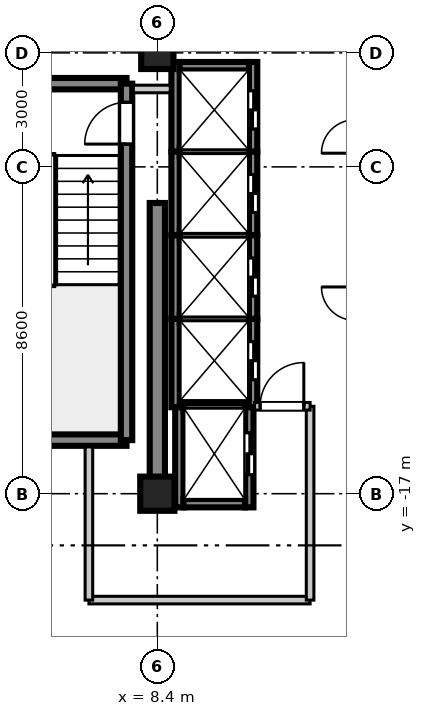
"""IFC4 building model, lengths in metres.
Left out: names, types, materials, properties, quantities, classifications, styles, units other than length and angle.
Written with IfcOpenShell. Run it as: python <this file> out.ifc"""

import sys

from ifc_helpers import new_model, si_unit, direction, frame, frame_2d, origin, origin_2d, place, context, subcontext, project, spatial, rectangle, extrude, source, transform, mapped, element, fill, save


model = new_model("IFC4")
c1 = context("Model", 3, precision=1e-05, world=origin(), true_north=direction((0.0, 1.0)))
c2 = subcontext(c1, "Body", "Model", "MODEL_VIEW")
j1 = project(units=[si_unit("LENGTHUNIT", "METRE"), si_unit("PLANEANGLEUNIT", "RADIAN")], contexts=[c1])
p1 = place(None, origin())
s1 = spatial("IfcSite", under=j1, at=p1, CompositionType="ELEMENT")
p2 = place(p1, origin())
s2 = spatial("IfcBuilding", under=s1, at=p2, CompositionType="ELEMENT")
p3 = place(p2, frame((0.0, 0.0, 327.15)))
s3 = spatial("IfcBuildingStorey", under=s2, at=p3, CompositionType="ELEMENT", Elevation=327.15)
m1 = source(origin(), c2, "Body", "SweptSolid", [
    extrude(rectangle(XDim=0.9, YDim=0.9, at=origin_2d()), origin(), (0.0, 0.0, 1.0), 3.755),
])
p4 = place(p3, frame((8.4, -17.0, 0.0), z_axis=(0.0, 0.0, 1.0), x_axis=(1.0, 0.0, 0.0)))
e1 = element("IfcColumn", 1, at=p4, inside=s3, PredefinedType="COLUMN", context=c2, shape_type="MappedRepresentation", body=[
    mapped(m1, transform((0.0, 0.0, 0.0), scale=1.0)),
])
m2 = source(origin(), c2, "Body", "SweptSolid", [
    extrude(rectangle(XDim=0.85, YDim=0.85, at=origin_2d()), origin(), (0.0, 0.0, 1.0), 3.755),
])
p5 = place(p3, frame((8.4, -5.4, 0.0), z_axis=(0.0, 0.0, 1.0), x_axis=(1.0, 0.0, 0.0)))
e2 = element("IfcColumn", 2, at=p5, inside=s3, PredefinedType="PILASTER", context=c2, shape_type="MappedRepresentation", body=[
    mapped(m2, transform((0.0, 0.0, 0.0), scale=1.0)),
])
m3 = source(origin(), c2, "Body", "SweptSolid", [
    extrude(rectangle(XDim=7.65, YDim=0.4, at=frame_2d((3.825, 0.0))), origin(), (0.0, 0.0, 1.0), 3.5),
])
p6 = place(p3, frame((8.4, -17.0, 0.0), z_axis=(0.0, 0.0, 1.0), x_axis=(0.0, 1.0, 0.0)))
e3 = element("IfcWall", 3, at=p6, inside=s3, PredefinedType="SHEAR", context=c2, shape_type="MappedRepresentation", body=[
    mapped(m3, transform((0.0, 0.0, 0.0), scale=1.0)),
])
m4 = source(origin(), c2, "Body", "SweptSolid", [
    extrude(rectangle(XDim=3.98, YDim=0.3, at=frame_2d((1.99, 0.0))), origin(), (0.0, 0.0, 1.0), 3.5),
])
for number, where, z_axis, x_axis in (
    (4, (3.61, -15.59, 0.0), (0.0, 0.0, 1.0), (1.0, 0.0, 0.0)),
    (5, (3.61, -6.21, 0.0), (0.0, 0.0, 1.0), (1.0, 0.0, 0.0)),
):
    element("IfcWall", number, at=place(p3, frame(where, z_axis=z_axis, x_axis=x_axis)), inside=s3, PredefinedType="SHEAR", context=c2, shape_type="MappedRepresentation", body=[
        mapped(m4, transform((0.0, 0.0, 0.0), scale=1.0)),
    ])
m5 = source(origin(), c2, "Body", "SweptSolid", [
    extrude(rectangle(XDim=9.38, YDim=0.3, at=frame_2d((4.69, 0.0))), origin(), (0.0, 0.0, 1.0), 3.5),
])
p7 = place(p3, frame((7.59, -15.59, 0.0), z_axis=(0.0, 0.0, 1.0), x_axis=(0.0, 1.0, 0.0)))
e6 = element("IfcWall", 6, at=p7, inside=s3, PredefinedType="SHEAR", context=c2, shape_type="MappedRepresentation", body=[
    mapped(m5, transform((0.0, 0.0, 0.0), scale=1.0)),
])
p8 = place(p7, frame((7.79, 0.0, 0.0)))
e7 = element("IfcOpeningElement", 7, at=p8, cuts=e6, PredefinedType="OPENING", context=c2, shape_type="SweptSolid", body=[
    extrude(rectangle(XDim=1.1, YDim=2.15, at=frame_2d((0.55, 1.075))), frame((0.0, 0.16, 0.0), z_axis=(0.0, -1.0, 0.0), x_axis=(1.0, 0.0, 0.0)), (0.0, 0.0, 1.0), 0.32),
])
m6 = source(origin(), c2, "Body", "SweptSolid", [
    extrude(rectangle(XDim=2.36, YDim=0.22, at=frame_2d((1.18, 0.0))), origin(), (0.0, 0.0, 1.0), 3.5),
])
p9 = place(p3, frame((8.88, -8.0, 0.0), z_axis=(0.0, 0.0, 1.0), x_axis=(0.0, 1.0, 0.0)))
e8 = element("IfcWall", 8, at=p9, inside=s3, PredefinedType="SHEAR", context=c2, shape_type="MappedRepresentation", body=[
    mapped(m6, transform((0.0, 0.0, 0.0), scale=1.0)),
])
p10 = place(p3, frame((10.92, -8.0, 0.0), z_axis=(0.0, 0.0, 1.0), x_axis=(0.0, 1.0, 0.0)))
e9 = element("IfcWall", 9, at=p10, inside=s3, PredefinedType="SHEAR", context=c2, shape_type="MappedRepresentation", body=[
    mapped(m6, transform((0.0, 0.0, 0.0), scale=1.0)),
])
p11 = place(p10, frame((0.6, 0.0, 0.0)))
e10 = element("IfcOpeningElement", 10, at=p11, cuts=e9, PredefinedType="OPENING", context=c2, shape_type="SweptSolid", body=[
    extrude(rectangle(XDim=1.0, YDim=2.2, at=frame_2d((0.5, 1.1))), frame((0.0, 0.12, 0.0), z_axis=(0.0, -1.0, 0.0), x_axis=(1.0, 0.0, 0.0)), (0.0, 0.0, 1.0), 0.24),
])
m7 = source(origin(), c2, "Body", "SweptSolid", [
    extrude(rectangle(XDim=1.82, YDim=0.22, at=frame_2d((0.91, 0.0))), origin(), (0.0, 0.0, 1.0), 3.5),
])
p12 = place(p3, frame((8.99, -5.75, 0.0), z_axis=(0.0, 0.0, 1.0), x_axis=(1.0, 0.0, 0.0)))
e11 = element("IfcWall", 11, at=p12, inside=s3, PredefinedType="SHEAR", context=c2, shape_type="MappedRepresentation", body=[
    mapped(m7, transform((0.0, 0.0, 0.0), scale=1.0)),
])
m8 = source(origin(), c2, "Body", "SweptSolid", [
    extrude(rectangle(XDim=2.2, YDim=0.22, at=frame_2d((1.1, 0.0))), origin(), (0.0, 0.0, 1.0), 3.5),
])
p13 = place(p3, frame((8.88, -10.2, 0.0), z_axis=(0.0, 0.0, 1.0), x_axis=(0.0, 1.0, 0.0)))
e12 = element("IfcWall", 12, at=p13, inside=s3, PredefinedType="SHEAR", context=c2, shape_type="MappedRepresentation", body=[
    mapped(m8, transform((0.0, 0.0, 0.0), scale=1.0)),
])
p14 = place(p3, frame((10.92, -10.2, 0.0), z_axis=(0.0, 0.0, 1.0), x_axis=(0.0, 1.0, 0.0)))
e13 = element("IfcWall", 13, at=p14, inside=s3, PredefinedType="SHEAR", context=c2, shape_type="MappedRepresentation", body=[
    mapped(m8, transform((0.0, 0.0, 0.0), scale=1.0)),
])
p15 = place(p14, frame((0.6, 0.0, 0.0)))
e14 = element("IfcOpeningElement", 14, at=p15, cuts=e13, PredefinedType="OPENING", context=c2, shape_type="SweptSolid", body=[
    extrude(rectangle(XDim=1.0, YDim=2.2, at=frame_2d((0.5, 1.1))), frame((0.0, 0.12, 0.0), z_axis=(0.0, -1.0, 0.0), x_axis=(1.0, 0.0, 0.0)), (0.0, 0.0, 1.0), 0.24),
])
m9 = source(origin(), c2, "Body", "SweptSolid", [
    extrude(rectangle(XDim=1.82, YDim=0.22, at=frame_2d((0.91, 0.0))), origin(), (0.0, 0.0, 1.0), 3.8),
])
p16 = place(p3, frame((8.99, -8.0, 0.0), z_axis=(0.0, 0.0, 1.0), x_axis=(1.0, 0.0, 0.0)))
e15 = element("IfcWall", 15, at=p16, inside=s3, PredefinedType="SHEAR", context=c2, shape_type="MappedRepresentation", body=[
    mapped(m9, transform((0.0, 0.0, 0.0), scale=1.0)),
])
p17 = place(p3, frame((8.88, -12.4, 0.0), z_axis=(0.0, 0.0, 1.0), x_axis=(0.0, 1.0, 0.0)))
e16 = element("IfcWall", 16, at=p17, inside=s3, PredefinedType="SHEAR", context=c2, shape_type="MappedRepresentation", body=[
    mapped(m8, transform((0.0, 0.0, 0.0), scale=1.0)),
])
p18 = place(p3, frame((10.92, -12.4, 0.0), z_axis=(0.0, 0.0, 1.0), x_axis=(0.0, 1.0, 0.0)))
e17 = element("IfcWall", 17, at=p18, inside=s3, PredefinedType="SHEAR", context=c2, shape_type="MappedRepresentation", body=[
    mapped(m8, transform((0.0, 0.0, 0.0), scale=1.0)),
])
p19 = place(p18, frame((0.6, 0.0, 0.0)))
e18 = element("IfcOpeningElement", 18, at=p19, cuts=e17, PredefinedType="OPENING", context=c2, shape_type="SweptSolid", body=[
    extrude(rectangle(XDim=1.0, YDim=2.2, at=frame_2d((0.5, 1.1))), frame((0.0, 0.12, 0.0), z_axis=(0.0, -1.0, 0.0), x_axis=(1.0, 0.0, 0.0)), (0.0, 0.0, 1.0), 0.24),
])
p20 = place(p3, frame((8.99, -10.2, 0.0), z_axis=(0.0, 0.0, 1.0), x_axis=(1.0, 0.0, 0.0)))
e19 = element("IfcWall", 19, at=p20, inside=s3, PredefinedType="SHEAR", context=c2, shape_type="MappedRepresentation", body=[
    mapped(m9, transform((0.0, 0.0, 0.0), scale=1.0)),
])
m10 = source(origin(), c2, "Body", "SweptSolid", [
    extrude(rectangle(XDim=2.325, YDim=0.22, at=frame_2d((1.163, 0.0))), origin(), (0.0, 0.0, 1.0), 3.5),
])
p21 = place(p3, frame((8.88, -14.725, 0.0), z_axis=(0.0, 0.0, 1.0), x_axis=(0.0, 1.0, 0.0)))
e20 = element("IfcWall", 20, at=p21, inside=s3, PredefinedType="SHEAR", context=c2, shape_type="MappedRepresentation", body=[
    mapped(m10, transform((0.0, 0.0, 0.0), scale=1.0)),
])
p22 = place(p3, frame((10.92, -14.725, 0.0), z_axis=(0.0, 0.0, 1.0), x_axis=(0.0, 1.0, 0.0)))
e21 = element("IfcWall", 21, at=p22, inside=s3, PredefinedType="SHEAR", context=c2, shape_type="MappedRepresentation", body=[
    mapped(m10, transform((0.0, 0.0, 0.0), scale=1.0)),
])
p23 = place(p22, frame((0.725, 0.0, 0.0)))
e22 = element("IfcOpeningElement", 22, at=p23, cuts=e21, PredefinedType="OPENING", context=c2, shape_type="SweptSolid", body=[
    extrude(rectangle(XDim=1.0, YDim=2.2, at=frame_2d((0.5, 1.1))), frame((0.0, 0.12, 0.0), z_axis=(0.0, -1.0, 0.0), x_axis=(1.0, 0.0, 0.0)), (0.0, 0.0, 1.0), 0.24),
])
p24 = place(p3, frame((8.99, -12.4, 0.0), z_axis=(0.0, 0.0, 1.0), x_axis=(1.0, 0.0, 0.0)))
e23 = element("IfcWall", 23, at=p24, inside=s3, PredefinedType="SHEAR", context=c2, shape_type="MappedRepresentation", body=[
    mapped(m9, transform((0.0, 0.0, 0.0), scale=1.0)),
])
m11 = source(origin(), c2, "Body", "SweptSolid", [
    extrude(rectangle(XDim=2.635, YDim=0.22, at=frame_2d((1.317, 0.0))), origin(), (0.0, 0.0, 1.0), 3.5),
])
p25 = place(p3, frame((8.98, -17.36, 0.0), z_axis=(0.0, 0.0, 1.0), x_axis=(0.0, 1.0, 0.0)))
e24 = element("IfcWall", 24, at=p25, inside=s3, PredefinedType="SHEAR", context=c2, shape_type="MappedRepresentation", body=[
    mapped(m11, transform((0.0, 0.0, 0.0), scale=1.0)),
])
p26 = place(p3, frame((10.82, -17.36, 0.0), z_axis=(0.0, 0.0, 1.0), x_axis=(0.0, 1.0, 0.0)))
e25 = element("IfcWall", 25, at=p26, inside=s3, PredefinedType="SHEAR", context=c2, shape_type="MappedRepresentation", body=[
    mapped(m11, transform((0.0, 0.0, 0.0), scale=1.0)),
])
p27 = place(p26, frame((0.86, 0.0, 0.0)))
e26 = element("IfcOpeningElement", 26, at=p27, cuts=e25, PredefinedType="OPENING", context=c2, shape_type="SweptSolid", body=[
    extrude(rectangle(XDim=1.1, YDim=2.2, at=frame_2d((0.55, 1.1))), frame((0.0, 0.12, 0.0), z_axis=(0.0, -1.0, 0.0), x_axis=(1.0, 0.0, 0.0)), (0.0, 0.0, 1.0), 0.24),
])
m12 = source(origin(), c2, "Body", "SweptSolid", [
    extrude(rectangle(XDim=1.62, YDim=0.22, at=frame_2d((0.81, 0.0))), origin(), (0.0, 0.0, 1.0), 3.5),
])
p28 = place(p3, frame((9.09, -17.25, 0.0), z_axis=(0.0, 0.0, 1.0), x_axis=(1.0, 0.0, 0.0)))
e27 = element("IfcWall", 27, at=p28, inside=s3, PredefinedType="SHEAR", context=c2, shape_type="MappedRepresentation", body=[
    mapped(m12, transform((0.0, 0.0, 0.0), scale=1.0)),
])
m13 = source(origin(), c2, "Body", "SweptSolid", [
    extrude(rectangle(XDim=1.62, YDim=0.22, at=frame_2d((0.81, 0.0))), origin(), (0.0, 0.0, 1.0), 3.8),
])
p29 = place(p3, frame((9.09, -14.725, 0.0), z_axis=(0.0, 0.0, 1.0), x_axis=(1.0, 0.0, 0.0)))
e28 = element("IfcWall", 28, at=p29, inside=s3, PredefinedType="SHEAR", context=c2, shape_type="MappedRepresentation", body=[
    mapped(m13, transform((0.0, 0.0, 0.0), scale=1.0)),
])
m14 = source(origin(), c2, "Body", "SweptSolid", [
    extrude(rectangle(XDim=5.82, YDim=0.2, at=frame_2d((2.91, 0.0))), origin(), (0.0, 0.0, 1.0), 2.84),
])
p30 = place(p3, frame((6.6, -19.8, 0.0), z_axis=(0.0, 0.0, 1.0), x_axis=(1.0, 0.0, 0.0)))
e29 = element("IfcWall", 29, at=p30, inside=s3, PredefinedType="PARTITIONING", context=c2, shape_type="MappedRepresentation", body=[
    mapped(m14, transform((0.0, 0.0, 0.0), scale=1.0)),
])
m15 = source(origin(), c2, "Body", "SweptSolid", [
    extrude(rectangle(XDim=4.03, YDim=0.2, at=frame_2d((2.015, 0.0))), origin(), (0.0, 0.0, 1.0), 2.84),
])
p31 = place(p3, frame((6.6, -19.8, 0.0), z_axis=(0.0, 0.0, 1.0), x_axis=(0.0, 1.0, 0.0)))
e30 = element("IfcWall", 30, at=p31, inside=s3, PredefinedType="PARTITIONING", context=c2, shape_type="MappedRepresentation", body=[
    mapped(m15, transform((0.0, 0.0, 0.0), scale=1.0)),
])
m16 = source(origin(), c2, "Body", "SweptSolid", [
    extrude(rectangle(XDim=5.1, YDim=0.2, at=frame_2d((2.55, 0.0))), origin(), (0.0, 0.0, 1.0), 2.84),
])
p32 = place(p3, frame((12.42, -19.8, 0.0), z_axis=(0.0, 0.0, 1.0), x_axis=(0.0, 1.0, 0.0)))
e31 = element("IfcWall", 31, at=p32, inside=s3, PredefinedType="PARTITIONING", context=c2, shape_type="MappedRepresentation", body=[
    mapped(m16, transform((0.0, 0.0, 0.0), scale=1.0)),
])
m17 = source(origin(), c2, "Body", "SweptSolid", [
    extrude(rectangle(XDim=1.46, YDim=0.2, at=frame_2d((0.73, 0.0))), origin(), (0.0, 0.0, 1.0), 2.84),
])
p33 = place(p3, frame((10.96, -14.7, 0.0), z_axis=(0.0, 0.0, 1.0), x_axis=(1.0, 0.0, 0.0)))
e32 = element("IfcWall", 32, at=p33, inside=s3, PredefinedType="PARTITIONING", context=c2, shape_type="MappedRepresentation", body=[
    mapped(m17, transform((0.0, 0.0, 0.0), scale=1.0)),
])
p34 = place(p33, frame((0.145, 0.0, 0.0)))
e33 = element("IfcOpeningElement", 33, at=p34, cuts=e32, PredefinedType="OPENING", context=c2, shape_type="SweptSolid", body=[
    extrude(rectangle(XDim=1.15, YDim=2.15, at=frame_2d((0.575, 1.075))), frame((0.0, 0.11, 0.0), z_axis=(0.0, -1.0, 0.0), x_axis=(1.0, 0.0, 0.0)), (0.0, 0.0, 1.0), 0.22),
])
m18 = source(origin(), c2, "Body", "SweptSolid", [
    extrude(rectangle(XDim=0.97, YDim=0.2, at=frame_2d((0.485, 0.0))), origin(), (0.0, 0.0, 1.0), 2.84),
])
p35 = place(p3, frame((7.77, -6.35, 0.0), z_axis=(0.0, 0.0, 1.0), x_axis=(1.0, 0.0, 0.0)))
e34 = element("IfcWall", 34, at=p35, inside=s3, PredefinedType="PARTITIONING", context=c2, shape_type="MappedRepresentation", body=[
    mapped(m18, transform((0.0, 0.0, 0.0), scale=1.0)),
])
m19 = source(origin(), c2, "Body", "SweptSolid", [
    extrude(rectangle(XDim=1.1, YDim=2.15, at=frame_2d((0.55, 1.075))), frame((0.0, 0.025, 0.0), z_axis=(0.0, -1.0, 0.0), x_axis=(1.0, 0.0, 0.0)), (0.0, 0.0, 1.0), 0.05),
])
p36 = place(p8, origin())
e35 = element("IfcDoor", 35, at=p36, inside=s3, OperationType="SINGLE_SWING_LEFT", PredefinedType="DOOR", context=c2, shape_type="MappedRepresentation", body=[
    mapped(m19, transform((0.0, 0.0, 0.0), scale=1.0)),
])
fill(e7, e35)
m20 = source(origin(), c2, "Body", "SweptSolid", [
    extrude(rectangle(XDim=1.0, YDim=2.2, at=frame_2d((0.5, 1.1))), frame((0.0, 0.025, 0.0), z_axis=(0.0, -1.0, 0.0), x_axis=(1.0, 0.0, 0.0)), (0.0, 0.0, 1.0), 0.05),
])
p37 = place(p11, frame((1.0, 0.0, 0.0), z_axis=(0.0, 0.0, 1.0), x_axis=(-1.0, 0.0, 0.0)))
e36 = element("IfcDoor", 36, at=p37, inside=s3, OperationType="DOUBLE_DOOR_SLIDING", PredefinedType="DOOR", context=c2, shape_type="MappedRepresentation", body=[
    mapped(m20, transform((0.0, 0.0, 0.0), scale=1.0)),
])
fill(e10, e36)
p38 = place(p15, frame((1.0, 0.0, 0.0), z_axis=(0.0, 0.0, 1.0), x_axis=(-1.0, 0.0, 0.0)))
e37 = element("IfcDoor", 37, at=p38, inside=s3, OperationType="DOUBLE_DOOR_SLIDING", PredefinedType="DOOR", context=c2, shape_type="MappedRepresentation", body=[
    mapped(m20, transform((0.0, 0.0, 0.0), scale=1.0)),
])
fill(e14, e37)
p39 = place(p19, frame((1.0, 0.0, 0.0), z_axis=(0.0, 0.0, 1.0), x_axis=(-1.0, 0.0, 0.0)))
e38 = element("IfcDoor", 38, at=p39, inside=s3, OperationType="DOUBLE_DOOR_SLIDING", PredefinedType="DOOR", context=c2, shape_type="MappedRepresentation", body=[
    mapped(m20, transform((0.0, 0.0, 0.0), scale=1.0)),
])
fill(e18, e38)
p40 = place(p23, frame((1.0, 0.0, 0.0), z_axis=(0.0, 0.0, 1.0), x_axis=(-1.0, 0.0, 0.0)))
e39 = element("IfcDoor", 39, at=p40, inside=s3, OperationType="DOUBLE_DOOR_SLIDING", PredefinedType="DOOR", context=c2, shape_type="MappedRepresentation", body=[
    mapped(m20, transform((0.0, 0.0, 0.0), scale=1.0)),
])
fill(e22, e39)
m21 = source(origin(), c2, "Body", "SweptSolid", [
    extrude(rectangle(XDim=1.1, YDim=2.2, at=frame_2d((0.55, 1.1))), frame((0.0, 0.025, 0.0), z_axis=(0.0, -1.0, 0.0), x_axis=(1.0, 0.0, 0.0)), (0.0, 0.0, 1.0), 0.05),
])
p41 = place(p27, frame((1.1, 0.0, 0.0), z_axis=(0.0, 0.0, 1.0), x_axis=(-1.0, 0.0, 0.0)))
e40 = element("IfcDoor", 40, at=p41, inside=s3, OperationType="DOUBLE_DOOR_SLIDING", PredefinedType="DOOR", context=c2, shape_type="MappedRepresentation", body=[
    mapped(m21, transform((0.0, 0.0, 0.0), scale=1.0)),
])
fill(e26, e40)
m22 = source(origin(), c2, "Body", "SweptSolid", [
    extrude(rectangle(XDim=1.15, YDim=2.15, at=frame_2d((0.575, 1.075))), frame((0.0, 0.025, 0.0), z_axis=(0.0, -1.0, 0.0), x_axis=(1.0, 0.0, 0.0)), (0.0, 0.0, 1.0), 0.05),
])
p42 = place(p34, origin())
e41 = element("IfcDoor", 41, at=p42, inside=s3, OperationType="SINGLE_SWING_RIGHT", PredefinedType="DOOR", context=c2, shape_type="MappedRepresentation", body=[
    mapped(m22, transform((0.0, 0.0, 0.0), scale=1.0)),
])
fill(e33, e41)
save(model, sys.argv[1])
